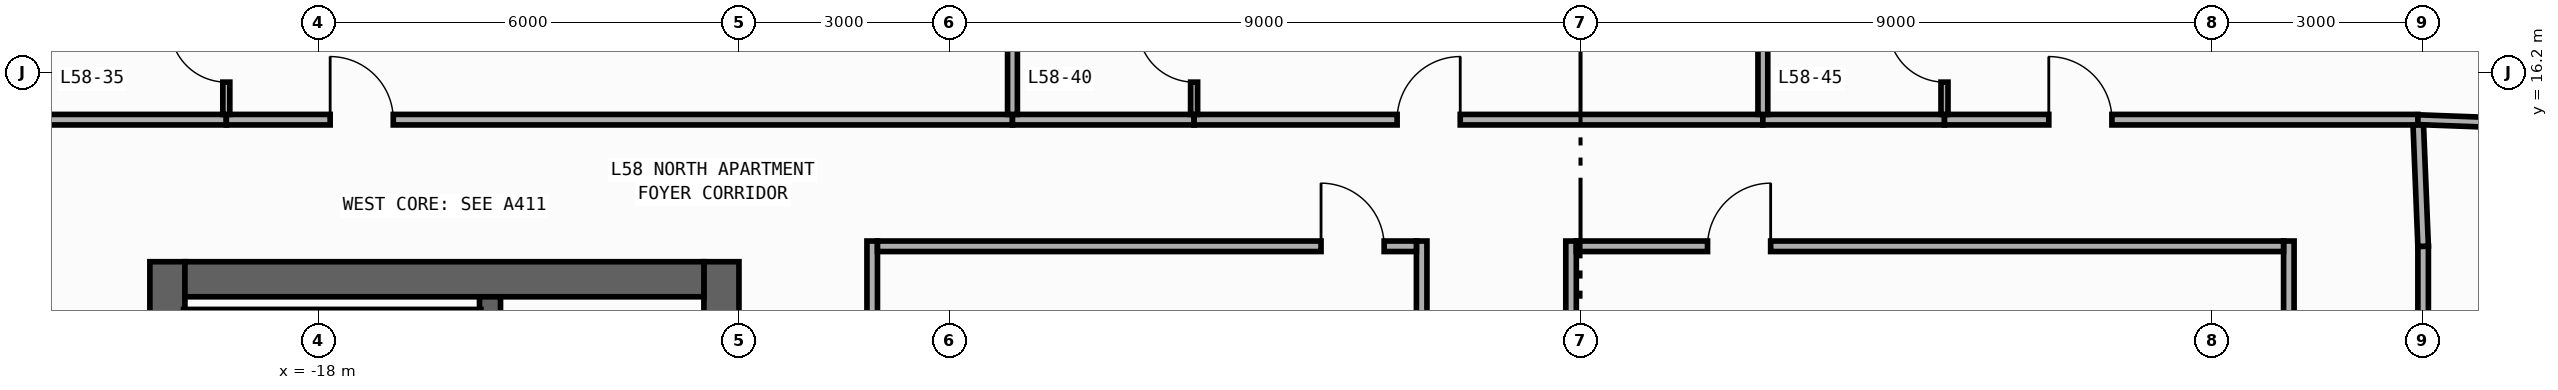
"""IFC4 building model, lengths in metres.
Left out: names, types, materials, properties, quantities, classifications, styles, units other than length and angle.
Written with IfcOpenShell. Run it as: python <this file> out.ifc"""

import sys

from ifc_helpers import new_model, si_unit, direction, frame, frame_2d, origin, place, context, subcontext, project, spatial, rectangle, extrude, element, fill, save


model = new_model("IFC4")
c1 = context("Model", 3, precision=1e-05, world=origin(), true_north=direction((0.0, 1.0)))
c2 = subcontext(c1, "Body", "Model", "MODEL_VIEW")
j1 = project(units=[si_unit("LENGTHUNIT", "METRE"), si_unit("PLANEANGLEUNIT", "RADIAN")], contexts=[c1])
p1 = place(None, origin())
s1 = spatial("IfcSite", under=j1, at=p1, CompositionType="ELEMENT")
p2 = place(p1, origin())
s2 = spatial("IfcBuilding", under=s1, at=p2, CompositionType="ELEMENT")
p3 = place(p2, frame((0.0, 0.0, 247.6)))
s3 = spatial("IfcBuildingStorey", under=s2, at=p3, CompositionType="ELEMENT", Elevation=247.6)
p4 = place(p3, frame((-20.15, -13.5, 0.0), z_axis=(0.0, 0.0, 1.0), x_axis=(0.0, 1.0, 0.0)))
e1 = element("IfcWall", 1, at=p4, inside=s3, PredefinedType="SHEAR", context=c2, shape_type="SweptSolid", body=[
    extrude(rectangle(XDim=27.0, YDim=0.5, at=frame_2d((13.5, 0.0))), origin(), (0.0, 0.0, 1.0), 3.34),
])
p5 = place(p3, frame((-12.25, -13.5, 0.0), z_axis=(0.0, 0.0, 1.0), x_axis=(0.0, 1.0, 0.0)))
e2 = element("IfcWall", 2, at=p5, inside=s3, PredefinedType="SHEAR", context=c2, shape_type="SweptSolid", body=[
    extrude(rectangle(XDim=27.0, YDim=0.5, at=frame_2d((13.5, 0.0))), origin(), (0.0, 0.0, 1.0), 3.34),
])
p6 = place(p5, frame((15.175, 0.0, 0.0)))
e3 = element("IfcOpeningElement", 3, at=p6, cuts=e2, PredefinedType="OPENING", context=c2, shape_type="SweptSolid", body=[
    extrude(rectangle(XDim=0.85, YDim=2.1, at=frame_2d((0.425, 1.05))), frame((0.0, 0.26, 0.0), z_axis=(0.0, -1.0, 0.0), x_axis=(1.0, 0.0, 0.0)), (0.0, 0.0, 1.0), 0.52),
])
p7 = place(p5, frame((21.275, 0.0, 0.0)))
e4 = element("IfcOpeningElement", 4, at=p7, cuts=e2, PredefinedType="OPENING", context=c2, shape_type="SweptSolid", body=[
    extrude(rectangle(XDim=0.85, YDim=2.1, at=frame_2d((0.425, 1.05))), frame((0.0, 0.26, 0.0), z_axis=(0.0, -1.0, 0.0), x_axis=(1.0, 0.0, 0.0)), (0.0, 0.0, 1.0), 0.52),
])
p8 = place(p5, frame((4.275, 0.0, 0.0)))
e5 = element("IfcOpeningElement", 5, at=p8, cuts=e2, PredefinedType="OPENING", context=c2, shape_type="SweptSolid", body=[
    extrude(rectangle(XDim=0.85, YDim=2.1, at=frame_2d((0.425, 1.05))), frame((0.0, 0.26, 0.0), z_axis=(0.0, -1.0, 0.0), x_axis=(1.0, 0.0, 0.0)), (0.0, 0.0, 1.0), 0.52),
])
p9 = place(p5, frame((10.275, 0.0, 0.0)))
e6 = element("IfcOpeningElement", 6, at=p9, cuts=e2, PredefinedType="OPENING", context=c2, shape_type="SweptSolid", body=[
    extrude(rectangle(XDim=0.85, YDim=2.1, at=frame_2d((0.425, 1.05))), frame((0.0, 0.26, 0.0), z_axis=(0.0, -1.0, 0.0), x_axis=(1.0, 0.0, 0.0)), (0.0, 0.0, 1.0), 0.52),
])
p10 = place(p5, frame((12.725, 0.0, 0.0)))
e7 = element("IfcOpeningElement", 7, at=p10, cuts=e2, PredefinedType="OPENING", context=c2, shape_type="SweptSolid", body=[
    extrude(rectangle(XDim=1.15, YDim=2.2, at=frame_2d((0.575, 1.1))), frame((0.0, 0.26, 0.0), z_axis=(0.0, -1.0, 0.0), x_axis=(1.0, 0.0, 0.0)), (0.0, 0.0, 1.0), 0.52),
])
p11 = place(p5, frame((1.625, 0.0, 0.0)))
e8 = element("IfcOpeningElement", 8, at=p11, cuts=e2, PredefinedType="OPENING", context=c2, shape_type="SweptSolid", body=[
    extrude(rectangle(XDim=0.85, YDim=2.1, at=frame_2d((0.425, 1.05))), frame((0.0, 0.26, 0.0), z_axis=(0.0, -1.0, 0.0), x_axis=(1.0, 0.0, 0.0)), (0.0, 0.0, 1.0), 0.52),
])
p12 = place(p3, frame((-19.9, 13.25, 0.0), z_axis=(0.0, 0.0, 1.0), x_axis=(1.0, 0.0, 0.0)))
e9 = element("IfcWall", 9, at=p12, inside=s3, PredefinedType="SHEAR", context=c2, shape_type="SweptSolid", body=[
    extrude(rectangle(XDim=7.4, YDim=0.5, at=frame_2d((3.7, 0.0))), origin(), (0.0, 0.0, 1.0), 3.34),
])
p13 = place(p3, frame((-15.55, -13.0, 0.0), z_axis=(0.0, 0.0, 1.0), x_axis=(0.0, 1.0, 0.0)))
e10 = element("IfcWall", 10, at=p13, inside=s3, PredefinedType="SHEAR", context=c2, shape_type="SweptSolid", body=[
    extrude(rectangle(XDim=26.0, YDim=0.3, at=frame_2d((13.0, 0.0))), origin(), (0.0, 0.0, 1.0), 3.34),
])
p14 = place(p13, frame((12.225, 0.0, 0.0)))
e11 = element("IfcOpeningElement", 11, at=p14, cuts=e10, PredefinedType="OPENING", context=c2, shape_type="SweptSolid", body=[
    extrude(rectangle(XDim=1.15, YDim=2.2, at=frame_2d((0.575, 1.1))), frame((0.0, 0.16, 0.0), z_axis=(0.0, -1.0, 0.0), x_axis=(1.0, 0.0, 0.0)), (0.0, 0.0, 1.0), 0.32),
])
p15 = place(p13, frame((1.125, 0.0, 0.0)))
e12 = element("IfcOpeningElement", 12, at=p15, cuts=e10, PredefinedType="OPENING", context=c2, shape_type="SweptSolid", body=[
    extrude(rectangle(XDim=0.85, YDim=2.1, at=frame_2d((0.425, 1.05))), frame((0.0, 0.16, 0.0), z_axis=(0.0, -1.0, 0.0), x_axis=(1.0, 0.0, 0.0)), (0.0, 0.0, 1.0), 0.32),
])
p16 = place(p3, frame((-19.92, 12.71, 0.0), z_axis=(0.0, 0.0, 1.0), x_axis=(1.0, 0.0, 0.0)))
e13 = element("IfcWall", 13, at=p16, inside=s3, PredefinedType="SHEAR", context=c2, shape_type="SweptSolid", body=[
    extrude(rectangle(XDim=4.24, YDim=0.22, at=frame_2d((2.12, 0.0))), origin(), (0.0, 0.0, 1.0), 3.34),
])
p17 = place(p3, frame((-10.1, -0.61, 0.0), z_axis=(0.0, 0.0, 1.0), x_axis=(0.0, 1.0, 0.0)))
e14 = element("IfcWall", 14, at=p17, inside=s3, PredefinedType="PARTITIONING", context=c2, shape_type="SweptSolid", body=[
    extrude(rectangle(XDim=14.405, YDim=0.15, at=frame_2d((7.203, 0.0))), origin(), (0.0, 0.0, 1.0), 3.34),
])
p18 = place(p17, frame((5.535, 0.0, 0.0)))
e15 = element("IfcOpeningElement", 15, at=p18, cuts=e14, PredefinedType="OPENING", context=c2, shape_type="SweptSolid", body=[
    extrude(rectangle(XDim=0.9, YDim=2.15, at=frame_2d((0.45, 1.075))), frame((0.0, 0.085, 0.0), z_axis=(0.0, -1.0, 0.0), x_axis=(1.0, 0.0, 0.0)), (0.0, 0.0, 1.0), 0.17),
])
p19 = place(p3, frame((12.015, 7.2, 0.0), z_axis=(0.0, 0.0, 1.0), x_axis=(0.0, 1.0, 0.0)))
e16 = element("IfcWall", 16, at=p19, inside=s3, PredefinedType="PARTITIONING", context=c2, shape_type="SweptSolid", body=[
    extrude(rectangle(XDim=6.52, YDim=0.15, at=frame_2d((3.26, 0.0))), origin(), (0.0, 0.0, 1.0), 3.34),
])
p20 = place(p19, frame((0.67, 0.0, 0.0)))
e17 = element("IfcOpeningElement", 17, at=p20, cuts=e16, PredefinedType="OPENING", context=c2, shape_type="SweptSolid", body=[
    extrude(rectangle(XDim=0.9, YDim=2.15, at=frame_2d((0.45, 1.075))), frame((0.0, 0.085, 0.0), z_axis=(0.0, -1.0, 0.0), x_axis=(1.0, 0.0, 0.0)), (0.0, 0.0, 1.0), 0.17),
])
p21 = place(p3, frame((10.1, -0.61, 0.0), z_axis=(0.0, 0.0, 1.0), x_axis=(0.0, 1.0, 0.0)))
e18 = element("IfcWall", 18, at=p21, inside=s3, PredefinedType="PARTITIONING", context=c2, shape_type="SweptSolid", body=[
    extrude(rectangle(XDim=14.405, YDim=0.15, at=frame_2d((7.203, 0.0))), origin(), (0.0, 0.0, 1.0), 3.34),
])
p22 = place(p21, frame((5.535, 0.0, 0.0)))
e19 = element("IfcOpeningElement", 19, at=p22, cuts=e18, PredefinedType="OPENING", context=c2, shape_type="SweptSolid", body=[
    extrude(rectangle(XDim=0.9, YDim=2.15, at=frame_2d((0.45, 1.075))), frame((0.0, 0.085, 0.0), z_axis=(0.0, -1.0, 0.0), x_axis=(1.0, 0.0, 0.0)), (0.0, 0.0, 1.0), 0.17),
])
p23 = place(p3, frame((-2.265, -0.46, 0.0), z_axis=(0.0, 0.0, 1.0), x_axis=(0.0, 1.0, 0.0)))
e20 = element("IfcWall", 20, at=p23, inside=s3, PredefinedType="PARTITIONING", context=c2, shape_type="SweptSolid", body=[
    extrude(rectangle(XDim=14.255, YDim=0.15, at=frame_2d((7.127, 0.0))), origin(), (0.0, 0.0, 1.0), 3.34),
])
p24 = place(p23, frame((5.474, 0.0, 0.0)))
e21 = element("IfcOpeningElement", 21, at=p24, cuts=e20, PredefinedType="OPENING", context=c2, shape_type="SweptSolid", body=[
    extrude(rectangle(XDim=0.9, YDim=2.15, at=frame_2d((0.45, 1.075))), frame((0.0, 0.085, 0.0), z_axis=(0.0, -1.0, 0.0), x_axis=(1.0, 0.0, 0.0)), (0.0, 0.0, 1.0), 0.17),
])
p25 = place(p3, frame((-0.135, -0.46, 0.0), z_axis=(0.0, 0.0, 1.0), x_axis=(0.0, 1.0, 0.0)))
e22 = element("IfcWall", 22, at=p25, inside=s3, PredefinedType="PARTITIONING", context=c2, shape_type="SweptSolid", body=[
    extrude(rectangle(XDim=14.255, YDim=0.15, at=frame_2d((7.127, 0.0))), origin(), (0.0, 0.0, 1.0), 3.34),
])
p26 = place(p25, frame((5.474, 0.0, 0.0)))
e23 = element("IfcOpeningElement", 23, at=p26, cuts=e22, PredefinedType="OPENING", context=c2, shape_type="SweptSolid", body=[
    extrude(rectangle(XDim=0.9, YDim=2.15, at=frame_2d((0.45, 1.075))), frame((0.0, 0.085, 0.0), z_axis=(0.0, -1.0, 0.0), x_axis=(1.0, 0.0, 0.0)), (0.0, 0.0, 1.0), 0.17),
])
p27 = place(p3, frame((-21.955, 15.525, 0.0), z_axis=(0.0, 0.0, 1.0), x_axis=(1.0, 0.0, 0.0)))
e24 = element("IfcWall", 24, at=p27, inside=s3, PredefinedType="PARTITIONING", context=c2, shape_type="SweptSolid", body=[
    extrude(rectangle(XDim=2.645, YDim=0.15, at=frame_2d((1.323, 0.0))), origin(), (0.0, 0.0, 1.0), 3.34),
])
p28 = place(p3, frame((-19.31, 15.525, 0.0), z_axis=(0.0, 0.0, 1.0), x_axis=(1.0, 0.0, 0.0)))
e25 = element("IfcWall", 25, at=p28, inside=s3, PredefinedType="PARTITIONING", context=c2, shape_type="SweptSolid", body=[
    extrude(rectangle(XDim=11.21, YDim=0.15, at=frame_2d((5.605, 0.0))), origin(), (0.0, 0.0, 1.0), 3.34),
])
p29 = place(p28, frame((1.481, 0.0, 0.0)))
e26 = element("IfcOpeningElement", 26, at=p29, cuts=e25, PredefinedType="OPENING", context=c2, shape_type="SweptSolid", body=[
    extrude(rectangle(XDim=0.9, YDim=2.15, at=frame_2d((0.45, 1.075))), frame((0.0, 0.085, 0.0), z_axis=(0.0, -1.0, 0.0), x_axis=(1.0, 0.0, 0.0)), (0.0, 0.0, 1.0), 0.17),
])
p30 = place(p3, frame((-8.1, 15.525, 0.0), z_axis=(0.0, 0.0, 1.0), x_axis=(1.0, 0.0, 0.0)))
e27 = element("IfcWall", 27, at=p30, inside=s3, PredefinedType="PARTITIONING", context=c2, shape_type="SweptSolid", body=[
    extrude(rectangle(XDim=2.59, YDim=0.15, at=frame_2d((1.295, 0.0))), origin(), (0.0, 0.0, 1.0), 3.34),
])
p31 = place(p3, frame((-5.51, 15.525, 0.0), z_axis=(0.0, 0.0, 1.0), x_axis=(1.0, 0.0, 0.0)))
e28 = element("IfcWall", 28, at=p31, inside=s3, PredefinedType="PARTITIONING", context=c2, shape_type="SweptSolid", body=[
    extrude(rectangle(XDim=8.11, YDim=0.15, at=frame_2d((4.055, 0.0))), origin(), (0.0, 0.0, 1.0), 3.34),
])
p32 = place(p31, frame((2.895, 0.0, 0.0)))
e29 = element("IfcOpeningElement", 29, at=p32, cuts=e28, PredefinedType="OPENING", context=c2, shape_type="SweptSolid", body=[
    extrude(rectangle(XDim=0.9, YDim=2.15, at=frame_2d((0.45, 1.075))), frame((0.0, 0.085, 0.0), z_axis=(0.0, -1.0, 0.0), x_axis=(1.0, 0.0, 0.0)), (0.0, 0.0, 1.0), 0.17),
])
p33 = place(p3, frame((2.6, 15.525, 0.0), z_axis=(0.0, 0.0, 1.0), x_axis=(1.0, 0.0, 0.0)))
e30 = element("IfcWall", 30, at=p33, inside=s3, PredefinedType="PARTITIONING", context=c2, shape_type="SweptSolid", body=[
    extrude(rectangle(XDim=2.59, YDim=0.15, at=frame_2d((1.295, 0.0))), origin(), (0.0, 0.0, 1.0), 3.34),
])
p34 = place(p3, frame((5.19, 15.525, 0.0), z_axis=(0.0, 0.0, 1.0), x_axis=(1.0, 0.0, 0.0)))
e31 = element("IfcWall", 31, at=p34, inside=s3, PredefinedType="PARTITIONING", context=c2, shape_type="SweptSolid", body=[
    extrude(rectangle(XDim=6.75, YDim=0.15, at=frame_2d((3.375, 0.0))), origin(), (0.0, 0.0, 1.0), 3.34),
])
p35 = place(p34, frame((1.487, 0.0, 0.0)))
e32 = element("IfcOpeningElement", 32, at=p35, cuts=e31, PredefinedType="OPENING", context=c2, shape_type="SweptSolid", body=[
    extrude(rectangle(XDim=0.9, YDim=2.15, at=frame_2d((0.45, 1.075))), frame((0.0, 0.085, 0.0), z_axis=(0.0, -1.0, 0.0), x_axis=(1.0, 0.0, 0.0)), (0.0, 0.0, 1.0), 0.17),
])
p36 = place(p3, frame((12.015, 13.72, 0.0), z_axis=(0.0, 0.0, 1.0), x_axis=(-0.040046877756, 0.99919780203, 0.0)))
e33 = element("IfcWall", 33, at=p36, inside=s3, PredefinedType="PARTITIONING", context=c2, shape_type="SweptSolid", body=[
    extrude(rectangle(XDim=1.731, YDim=0.15, at=frame_2d((0.866, 0.0))), origin(), (0.0, 0.0, 1.0), 3.34),
])
p37 = place(p3, frame((-10.025, 13.72, 0.0), z_axis=(0.0, 0.0, 1.0), x_axis=(1.0, 0.0, 0.0)))
e34 = element("IfcWall", 34, at=p37, inside=s3, PredefinedType="PARTITIONING", context=c2, shape_type="SweptSolid", body=[
    extrude(rectangle(XDim=7.685, YDim=0.15, at=frame_2d((3.842, 0.0))), origin(), (0.0, 0.0, 1.0), 3.34),
])
p38 = place(p37, frame((6.325, 0.0, 0.0)))
e35 = element("IfcOpeningElement", 35, at=p38, cuts=e34, PredefinedType="OPENING", context=c2, shape_type="SweptSolid", body=[
    extrude(rectangle(XDim=0.9, YDim=2.15, at=frame_2d((0.45, 1.075))), frame((0.0, 0.085, 0.0), z_axis=(0.0, -1.0, 0.0), x_axis=(1.0, 0.0, 0.0)), (0.0, 0.0, 1.0), 0.17),
])
p39 = place(p3, frame((-0.06, 13.72, 0.0), z_axis=(0.0, 0.0, 1.0), x_axis=(1.0, 0.0, 0.0)))
e36 = element("IfcWall", 36, at=p39, inside=s3, PredefinedType="PARTITIONING", context=c2, shape_type="SweptSolid", body=[
    extrude(rectangle(XDim=10.085, YDim=0.15, at=frame_2d((5.042, 0.0))), origin(), (0.0, 0.0, 1.0), 3.34),
])
p40 = place(p39, frame((1.871, 0.0, 0.0)))
e37 = element("IfcOpeningElement", 37, at=p40, cuts=e36, PredefinedType="OPENING", context=c2, shape_type="SweptSolid", body=[
    extrude(rectangle(XDim=0.9, YDim=2.15, at=frame_2d((0.45, 1.075))), frame((0.0, 0.085, 0.0), z_axis=(0.0, -1.0, 0.0), x_axis=(1.0, 0.0, 0.0)), (0.0, 0.0, 1.0), 0.17),
])
p41 = place(p3, frame((-19.31, 15.6, 0.0), z_axis=(0.0, 0.0, 1.0), x_axis=(0.0, 1.0, 0.0)))
e38 = element("IfcWall", 38, at=p41, inside=s3, PredefinedType="PARTITIONING", context=c2, shape_type="SweptSolid", body=[
    extrude(rectangle(XDim=2.5, YDim=0.1, at=frame_2d((1.25, 0.0))), origin(), (0.0, 0.0, 1.0), 3.34),
])
p42 = place(p41, frame((0.46, 0.0, 0.0)))
e39 = element("IfcOpeningElement", 39, at=p42, cuts=e38, PredefinedType="OPENING", context=c2, shape_type="SweptSolid", body=[
    extrude(rectangle(XDim=0.8, YDim=2.1, at=frame_2d((0.4, 1.05))), frame((0.0, 0.06, 0.0), z_axis=(0.0, -1.0, 0.0), x_axis=(1.0, 0.0, 0.0)), (0.0, 0.0, 1.0), 0.12),
])
p43 = place(p3, frame((-8.1, 15.6, 0.0), z_axis=(0.0, 0.0, 1.0), x_axis=(0.0, 1.0, 0.0)))
e40 = element("IfcWall", 40, at=p43, inside=s3, PredefinedType="PARTITIONING", context=c2, shape_type="SweptSolid", body=[
    extrude(rectangle(XDim=2.5, YDim=0.14, at=frame_2d((1.25, 0.0))), origin(), (0.0, 0.0, 1.0), 3.34),
])
p44 = place(p3, frame((-5.51, 15.6, 0.0), z_axis=(0.0, 0.0, 1.0), x_axis=(0.0, 1.0, 0.0)))
e41 = element("IfcWall", 41, at=p44, inside=s3, PredefinedType="PARTITIONING", context=c2, shape_type="SweptSolid", body=[
    extrude(rectangle(XDim=2.5, YDim=0.1, at=frame_2d((1.25, 0.0))), origin(), (0.0, 0.0, 1.0), 3.34),
])
p45 = place(p44, frame((0.46, 0.0, 0.0)))
e42 = element("IfcOpeningElement", 42, at=p45, cuts=e41, PredefinedType="OPENING", context=c2, shape_type="SweptSolid", body=[
    extrude(rectangle(XDim=0.8, YDim=2.1, at=frame_2d((0.4, 1.05))), frame((0.0, 0.06, 0.0), z_axis=(0.0, -1.0, 0.0), x_axis=(1.0, 0.0, 0.0)), (0.0, 0.0, 1.0), 0.12),
])
p46 = place(p3, frame((2.6, 15.6, 0.0), z_axis=(0.0, 0.0, 1.0), x_axis=(0.0, 1.0, 0.0)))
e43 = element("IfcWall", 43, at=p46, inside=s3, PredefinedType="PARTITIONING", context=c2, shape_type="SweptSolid", body=[
    extrude(rectangle(XDim=2.5, YDim=0.14, at=frame_2d((1.25, 0.0))), origin(), (0.0, 0.0, 1.0), 3.34),
])
p47 = place(p3, frame((5.19, 15.6, 0.0), z_axis=(0.0, 0.0, 1.0), x_axis=(0.0, 1.0, 0.0)))
e44 = element("IfcWall", 44, at=p47, inside=s3, PredefinedType="PARTITIONING", context=c2, shape_type="SweptSolid", body=[
    extrude(rectangle(XDim=2.5, YDim=0.1, at=frame_2d((1.25, 0.0))), origin(), (0.0, 0.0, 1.0), 3.34),
])
p48 = place(p47, frame((0.46, 0.0, 0.0)))
e45 = element("IfcOpeningElement", 45, at=p48, cuts=e44, PredefinedType="OPENING", context=c2, shape_type="SweptSolid", body=[
    extrude(rectangle(XDim=0.8, YDim=2.1, at=frame_2d((0.4, 1.05))), frame((0.0, 0.06, 0.0), z_axis=(0.0, -1.0, 0.0), x_axis=(1.0, 0.0, 0.0)), (0.0, 0.0, 1.0), 0.12),
])
p49 = place(p3, frame((11.94, 15.525, 0.0), z_axis=(0.0, 0.0, 1.0), x_axis=(0.999304229002, -0.037296888581, 0.0)))
e46 = element("IfcWall", 46, at=p49, inside=s3, PredefinedType="PARTITIONING", context=c2, shape_type="SweptSolid", body=[
    extrude(rectangle(XDim=1.741, YDim=0.14, at=frame_2d((0.871, 0.0))), origin(), (0.0, 0.0, 1.0), 3.34),
])
p50 = place(p29, origin())
e47 = element("IfcDoor", 47, at=p50, inside=s3, OperationType="SINGLE_SWING_LEFT", PredefinedType="DOOR", context=c2, shape_type="SweptSolid", body=[
    extrude(rectangle(XDim=0.9, YDim=2.15, at=frame_2d((0.45, 1.075))), frame((0.0, 0.025, 0.0), z_axis=(0.0, -1.0, 0.0), x_axis=(1.0, 0.0, 0.0)), (0.0, 0.0, 1.0), 0.05),
])
fill(e26, e47)
p51 = place(p32, origin())
e48 = element("IfcDoor", 48, at=p51, inside=s3, OperationType="SINGLE_SWING_RIGHT", PredefinedType="DOOR", context=c2, shape_type="SweptSolid", body=[
    extrude(rectangle(XDim=0.9, YDim=2.15, at=frame_2d((0.45, 1.075))), frame((0.0, 0.025, 0.0), z_axis=(0.0, -1.0, 0.0), x_axis=(1.0, 0.0, 0.0)), (0.0, 0.0, 1.0), 0.05),
])
fill(e29, e48)
p52 = place(p35, origin())
e49 = element("IfcDoor", 49, at=p52, inside=s3, OperationType="SINGLE_SWING_LEFT", PredefinedType="DOOR", context=c2, shape_type="SweptSolid", body=[
    extrude(rectangle(XDim=0.9, YDim=2.15, at=frame_2d((0.45, 1.075))), frame((0.0, 0.025, 0.0), z_axis=(0.0, -1.0, 0.0), x_axis=(1.0, 0.0, 0.0)), (0.0, 0.0, 1.0), 0.05),
])
fill(e32, e49)
p53 = place(p38, origin())
e50 = element("IfcDoor", 50, at=p53, inside=s3, OperationType="SINGLE_SWING_LEFT", PredefinedType="DOOR", context=c2, shape_type="SweptSolid", body=[
    extrude(rectangle(XDim=0.9, YDim=2.15, at=frame_2d((0.45, 1.075))), frame((0.0, 0.025, 0.0), z_axis=(0.0, -1.0, 0.0), x_axis=(1.0, 0.0, 0.0)), (0.0, 0.0, 1.0), 0.05),
])
fill(e35, e50)
p54 = place(p40, origin())
e51 = element("IfcDoor", 51, at=p54, inside=s3, OperationType="SINGLE_SWING_RIGHT", PredefinedType="DOOR", context=c2, shape_type="SweptSolid", body=[
    extrude(rectangle(XDim=0.9, YDim=2.15, at=frame_2d((0.45, 1.075))), frame((0.0, 0.025, 0.0), z_axis=(0.0, -1.0, 0.0), x_axis=(1.0, 0.0, 0.0)), (0.0, 0.0, 1.0), 0.05),
])
fill(e37, e51)
p55 = place(p42, origin())
e52 = element("IfcDoor", 52, at=p55, inside=s3, OperationType="SINGLE_SWING_RIGHT", PredefinedType="DOOR", context=c2, shape_type="SweptSolid", body=[
    extrude(rectangle(XDim=0.8, YDim=2.1, at=frame_2d((0.4, 1.05))), frame((0.0, 0.025, 0.0), z_axis=(0.0, -1.0, 0.0), x_axis=(1.0, 0.0, 0.0)), (0.0, 0.0, 1.0), 0.05),
])
fill(e39, e52)
p56 = place(p45, origin())
e53 = element("IfcDoor", 53, at=p56, inside=s3, OperationType="SINGLE_SWING_RIGHT", PredefinedType="DOOR", context=c2, shape_type="SweptSolid", body=[
    extrude(rectangle(XDim=0.8, YDim=2.1, at=frame_2d((0.4, 1.05))), frame((0.0, 0.025, 0.0), z_axis=(0.0, -1.0, 0.0), x_axis=(1.0, 0.0, 0.0)), (0.0, 0.0, 1.0), 0.05),
])
fill(e42, e53)
p57 = place(p48, origin())
e54 = element("IfcDoor", 54, at=p57, inside=s3, OperationType="SINGLE_SWING_RIGHT", PredefinedType="DOOR", context=c2, shape_type="SweptSolid", body=[
    extrude(rectangle(XDim=0.8, YDim=2.1, at=frame_2d((0.4, 1.05))), frame((0.0, 0.025, 0.0), z_axis=(0.0, -1.0, 0.0), x_axis=(1.0, 0.0, 0.0)), (0.0, 0.0, 1.0), 0.05),
])
fill(e45, e54)
save(model, sys.argv[1])
